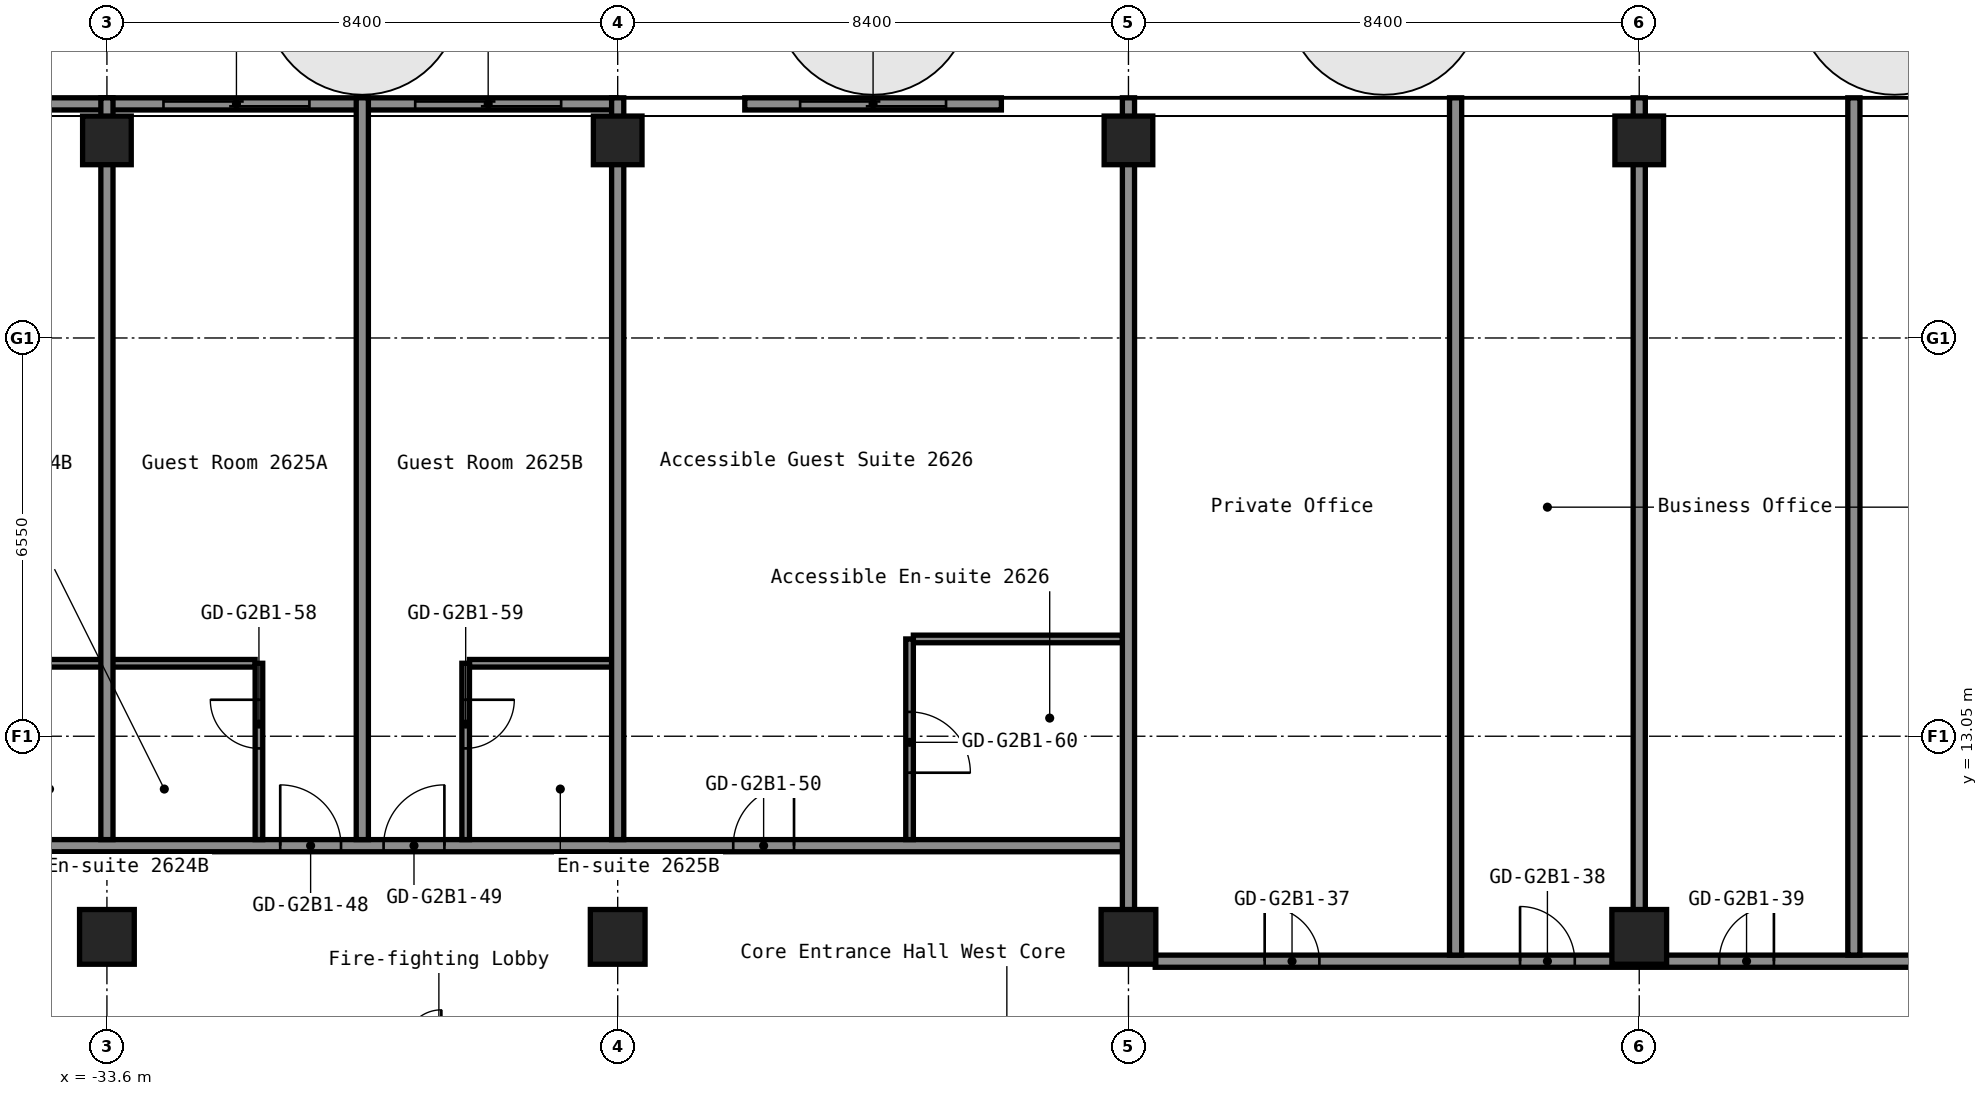
"""IFC4 building model, lengths in metres.
Left out: names, types, materials, properties, quantities, classifications, styles, units other than length and angle.
Written with IfcOpenShell. Run it as: python <this file> out.ifc"""

import sys

from ifc_helpers import new_model, si_unit, direction, frame, frame_2d, origin, origin_2d, place, context, subcontext, project, spatial, rectangle, hollow_rectangle, extrude, element, fill, save


model = new_model("IFC4")
c1 = context("Model", 3, precision=1e-05, world=origin(), true_north=direction((0.0, 1.0)))
c2 = subcontext(c1, "Body", "Model", "MODEL_VIEW")
j1 = project(units=[si_unit("LENGTHUNIT", "METRE"), si_unit("PLANEANGLEUNIT", "RADIAN")], contexts=[c1])
p1 = place(None, origin())
s1 = spatial("IfcSite", under=j1, at=p1, CompositionType="ELEMENT")
p2 = place(p1, origin())
s2 = spatial("IfcBuilding", under=s1, at=p2, CompositionType="ELEMENT")
p3 = place(p2, frame((0.0, 0.0, 94.6)))
s3 = spatial("IfcBuildingStorey", under=s2, at=p3, CompositionType="ELEMENT", Elevation=94.6)
p4 = place(p3, frame((-33.6, 9.75, 0.0), z_axis=(0.0, 0.0, 1.0), x_axis=(1.0, 0.0, 0.0)))
e1 = element("IfcColumn", 1, at=p4, inside=s3, PredefinedType="COLUMN", context=c2, shape_type="SweptSolid", body=[
    extrude(hollow_rectangle(XDim=0.9, YDim=0.9, WallThickness=0.036, at=origin_2d()), origin(), (0.0, 0.0, 1.0), 2.8),
])
p5 = place(p3, frame((-33.6, 22.85, 0.0), z_axis=(0.0, 0.0, 1.0), x_axis=(1.0, 0.0, 0.0)))
e2 = element("IfcColumn", 2, at=p5, inside=s3, PredefinedType="COLUMN", context=c2, shape_type="SweptSolid", body=[
    extrude(hollow_rectangle(XDim=0.8, YDim=0.8, WallThickness=0.032, at=origin_2d()), origin(), (0.0, 0.0, 1.0), 2.8),
])
p6 = place(p3, frame((-25.2, 9.75, 0.0), z_axis=(0.0, 0.0, 1.0), x_axis=(1.0, 0.0, 0.0)))
e3 = element("IfcColumn", 3, at=p6, inside=s3, PredefinedType="COLUMN", context=c2, shape_type="SweptSolid", body=[
    extrude(hollow_rectangle(XDim=0.9, YDim=0.9, WallThickness=0.036, at=origin_2d()), origin(), (0.0, 0.0, 1.0), 2.8),
])
p7 = place(p3, frame((-25.2, 22.85, 0.0), z_axis=(0.0, 0.0, 1.0), x_axis=(1.0, 0.0, 0.0)))
e4 = element("IfcColumn", 4, at=p7, inside=s3, PredefinedType="COLUMN", context=c2, shape_type="SweptSolid", body=[
    extrude(hollow_rectangle(XDim=0.8, YDim=0.8, WallThickness=0.032, at=origin_2d()), origin(), (0.0, 0.0, 1.0), 2.8),
])
p8 = place(p3, frame((-16.8, 9.75, 0.0), z_axis=(0.0, 0.0, 1.0), x_axis=(1.0, 0.0, 0.0)))
e5 = element("IfcColumn", 5, at=p8, inside=s3, PredefinedType="COLUMN", context=c2, shape_type="SweptSolid", body=[
    extrude(hollow_rectangle(XDim=0.9, YDim=0.9, WallThickness=0.036, at=origin_2d()), origin(), (0.0, 0.0, 1.0), 2.8),
])
p9 = place(p3, frame((-16.8, 22.85, 0.0), z_axis=(0.0, 0.0, 1.0), x_axis=(1.0, 0.0, 0.0)))
e6 = element("IfcColumn", 6, at=p9, inside=s3, PredefinedType="COLUMN", context=c2, shape_type="SweptSolid", body=[
    extrude(hollow_rectangle(XDim=0.8, YDim=0.8, WallThickness=0.032, at=origin_2d()), origin(), (0.0, 0.0, 1.0), 2.8),
])
p10 = place(p3, frame((-8.4, 9.75, 0.0), z_axis=(0.0, 0.0, 1.0), x_axis=(1.0, 0.0, 0.0)))
e7 = element("IfcColumn", 7, at=p10, inside=s3, PredefinedType="COLUMN", context=c2, shape_type="SweptSolid", body=[
    extrude(hollow_rectangle(XDim=0.9, YDim=0.9, WallThickness=0.036, at=origin_2d()), origin(), (0.0, 0.0, 1.0), 2.8),
])
p11 = place(p3, frame((-8.4, 22.85, 0.0), z_axis=(0.0, 0.0, 1.0), x_axis=(1.0, 0.0, 0.0)))
e8 = element("IfcColumn", 8, at=p11, inside=s3, PredefinedType="COLUMN", context=c2, shape_type="SweptSolid", body=[
    extrude(hollow_rectangle(XDim=0.8, YDim=0.8, WallThickness=0.032, at=origin_2d()), origin(), (0.0, 0.0, 1.0), 2.8),
])
p12 = place(p3, frame((-16.36, 9.35, 0.0), z_axis=(0.0, 0.0, 1.0), x_axis=(1.0, 0.0, 0.0)))
e9 = element("IfcWall", 9, at=p12, inside=s3, PredefinedType="PARTITIONING", context=c2, shape_type="SweptSolid", body=[
    extrude(rectangle(XDim=32.72, YDim=0.2, at=frame_2d((16.36, 0.0))), origin(), (0.0, 0.0, 1.0), 2.8),
])
p13 = place(p12, frame((1.8, 0.0, 0.0)))
e10 = element("IfcOpeningElement", 10, at=p13, cuts=e9, PredefinedType="OPENING", context=c2, shape_type="SweptSolid", body=[
    extrude(rectangle(XDim=0.9, YDim=2.1, at=frame_2d((0.45, 1.05))), frame((0.0, 0.11, 0.0), z_axis=(0.0, -1.0, 0.0), x_axis=(1.0, 0.0, 0.0)), (0.0, 0.0, 1.0), 0.22),
])
p14 = place(p12, frame((6.0, 0.0, 0.0)))
e11 = element("IfcOpeningElement", 11, at=p14, cuts=e9, PredefinedType="OPENING", context=c2, shape_type="SweptSolid", body=[
    extrude(rectangle(XDim=0.9, YDim=2.1, at=frame_2d((0.45, 1.05))), frame((0.0, 0.11, 0.0), z_axis=(0.0, -1.0, 0.0), x_axis=(1.0, 0.0, 0.0)), (0.0, 0.0, 1.0), 0.22),
])
p15 = place(p12, frame((9.275, 0.0, 0.0)))
e12 = element("IfcOpeningElement", 12, at=p15, cuts=e9, PredefinedType="OPENING", context=c2, shape_type="SweptSolid", body=[
    extrude(rectangle(XDim=0.9, YDim=2.1, at=frame_2d((0.45, 1.05))), frame((0.0, 0.11, 0.0), z_axis=(0.0, -1.0, 0.0), x_axis=(1.0, 0.0, 0.0)), (0.0, 0.0, 1.0), 0.22),
])
p16 = place(p12, frame((13.475, 0.0, 0.0)))
e13 = element("IfcOpeningElement", 13, at=p16, cuts=e9, PredefinedType="OPENING", context=c2, shape_type="SweptSolid", body=[
    extrude(rectangle(XDim=0.9, YDim=2.1, at=frame_2d((0.45, 1.05))), frame((0.0, 0.11, 0.0), z_axis=(0.0, -1.0, 0.0), x_axis=(1.0, 0.0, 0.0)), (0.0, 0.0, 1.0), 0.22),
])
p17 = place(p12, frame((19.21, 0.0, 0.0)))
e14 = element("IfcOpeningElement", 14, at=p17, cuts=e9, PredefinedType="OPENING", context=c2, shape_type="SweptSolid", body=[
    extrude(rectangle(XDim=1.0, YDim=2.1, at=frame_2d((0.5, 1.05))), frame((0.0, 0.11, 0.0), z_axis=(0.0, -1.0, 0.0), x_axis=(1.0, 0.0, 0.0)), (0.0, 0.0, 1.0), 0.22),
])
p18 = place(p12, frame((20.91, 0.0, 0.0)))
e15 = element("IfcOpeningElement", 15, at=p18, cuts=e9, PredefinedType="OPENING", context=c2, shape_type="SweptSolid", body=[
    extrude(rectangle(XDim=1.0, YDim=2.1, at=frame_2d((0.5, 1.05))), frame((0.0, 0.11, 0.0), z_axis=(0.0, -1.0, 0.0), x_axis=(1.0, 0.0, 0.0)), (0.0, 0.0, 1.0), 0.22),
])
p19 = place(p12, frame((27.61, 0.0, 0.0)))
e16 = element("IfcOpeningElement", 16, at=p19, cuts=e9, PredefinedType="OPENING", context=c2, shape_type="SweptSolid", body=[
    extrude(rectangle(XDim=1.0, YDim=2.1, at=frame_2d((0.5, 1.05))), frame((0.0, 0.11, 0.0), z_axis=(0.0, -1.0, 0.0), x_axis=(1.0, 0.0, 0.0)), (0.0, 0.0, 1.0), 0.22),
])
p20 = place(p12, frame((29.31, 0.0, 0.0)))
e17 = element("IfcOpeningElement", 17, at=p20, cuts=e9, PredefinedType="OPENING", context=c2, shape_type="SweptSolid", body=[
    extrude(rectangle(XDim=1.0, YDim=2.1, at=frame_2d((0.5, 1.05))), frame((0.0, 0.11, 0.0), z_axis=(0.0, -1.0, 0.0), x_axis=(1.0, 0.0, 0.0)), (0.0, 0.0, 1.0), 0.22),
])
p21 = place(p3, frame((-46.5, 11.25, 0.0), z_axis=(0.0, 0.0, 1.0), x_axis=(1.0, 0.0, 0.0)))
e18 = element("IfcWall", 18, at=p21, inside=s3, PredefinedType="PARTITIONING", context=c2, shape_type="SweptSolid", body=[
    extrude(rectangle(XDim=29.7, YDim=0.2, at=frame_2d((14.85, 0.0))), origin(), (0.0, 0.0, 1.0), 2.8),
])
p22 = place(p21, frame((1.95, 0.0, 0.0)))
e19 = element("IfcOpeningElement", 19, at=p22, cuts=e18, PredefinedType="OPENING", context=c2, shape_type="SweptSolid", body=[
    extrude(rectangle(XDim=0.9, YDim=2.1, at=frame_2d((0.45, 1.05))), frame((0.0, 0.11, 0.0), z_axis=(0.0, -1.0, 0.0), x_axis=(1.0, 0.0, 0.0)), (0.0, 0.0, 1.0), 0.22),
])
p23 = place(p21, frame((7.35, 0.0, 0.0)))
e20 = element("IfcOpeningElement", 20, at=p23, cuts=e18, PredefinedType="OPENING", context=c2, shape_type="SweptSolid", body=[
    extrude(rectangle(XDim=1.0, YDim=2.1, at=frame_2d((0.5, 1.05))), frame((0.0, 0.11, 0.0), z_axis=(0.0, -1.0, 0.0), x_axis=(1.0, 0.0, 0.0)), (0.0, 0.0, 1.0), 0.22),
])
p24 = place(p21, frame((9.05, 0.0, 0.0)))
e21 = element("IfcOpeningElement", 21, at=p24, cuts=e18, PredefinedType="OPENING", context=c2, shape_type="SweptSolid", body=[
    extrude(rectangle(XDim=1.0, YDim=2.1, at=frame_2d((0.5, 1.05))), frame((0.0, 0.11, 0.0), z_axis=(0.0, -1.0, 0.0), x_axis=(1.0, 0.0, 0.0)), (0.0, 0.0, 1.0), 0.22),
])
p25 = place(p21, frame((15.75, 0.0, 0.0)))
e22 = element("IfcOpeningElement", 22, at=p25, cuts=e18, PredefinedType="OPENING", context=c2, shape_type="SweptSolid", body=[
    extrude(rectangle(XDim=1.0, YDim=2.1, at=frame_2d((0.5, 1.05))), frame((0.0, 0.11, 0.0), z_axis=(0.0, -1.0, 0.0), x_axis=(1.0, 0.0, 0.0)), (0.0, 0.0, 1.0), 0.22),
])
p26 = place(p21, frame((17.45, 0.0, 0.0)))
e23 = element("IfcOpeningElement", 23, at=p26, cuts=e18, PredefinedType="OPENING", context=c2, shape_type="SweptSolid", body=[
    extrude(rectangle(XDim=1.0, YDim=2.1, at=frame_2d((0.5, 1.05))), frame((0.0, 0.11, 0.0), z_axis=(0.0, -1.0, 0.0), x_axis=(1.0, 0.0, 0.0)), (0.0, 0.0, 1.0), 0.22),
])
p27 = place(p21, frame((23.2, 0.0, 0.0)))
e24 = element("IfcOpeningElement", 24, at=p27, cuts=e18, PredefinedType="OPENING", context=c2, shape_type="SweptSolid", body=[
    extrude(rectangle(XDim=1.0, YDim=2.1, at=frame_2d((0.5, 1.05))), frame((0.0, 0.11, 0.0), z_axis=(0.0, -1.0, 0.0), x_axis=(1.0, 0.0, 0.0)), (0.0, 0.0, 1.0), 0.22),
])
p28 = place(p3, frame((-36.038, 14.25, 0.0), z_axis=(0.0, 0.0, 1.0), x_axis=(1.0, 0.0, 0.0)))
e25 = element("IfcWall", 25, at=p28, inside=s3, PredefinedType="PARTITIONING", context=c2, shape_type="SweptSolid", body=[
    extrude(rectangle(XDim=4.875, YDim=0.125, at=frame_2d((2.438, 0.0))), origin(), (0.0, 0.0, 1.0), 2.8),
])
p29 = place(p3, frame((-27.637, 14.25, 0.0), z_axis=(0.0, 0.0, 1.0), x_axis=(1.0, 0.0, 0.0)))
e26 = element("IfcWall", 26, at=p29, inside=s3, PredefinedType="PARTITIONING", context=c2, shape_type="SweptSolid", body=[
    extrude(rectangle(XDim=2.337, YDim=0.125, at=frame_2d((1.169, 0.0))), origin(), (0.0, 0.0, 1.0), 2.8),
])
p30 = place(p3, frame((-20.337, 14.65, 0.0), z_axis=(0.0, 0.0, 1.0), x_axis=(1.0, 0.0, 0.0)))
e27 = element("IfcWall", 27, at=p30, inside=s3, PredefinedType="PARTITIONING", context=c2, shape_type="SweptSolid", body=[
    extrude(rectangle(XDim=3.438, YDim=0.125, at=frame_2d((1.719, 0.0))), origin(), (0.0, 0.0, 1.0), 2.8),
])
p31 = place(p3, frame((-33.6, 11.35, 0.0), z_axis=(0.0, 0.0, 1.0), x_axis=(0.0, 1.0, 0.0)))
e28 = element("IfcWall", 28, at=p31, inside=s3, PredefinedType="PARTITIONING", context=c2, shape_type="SweptSolid", body=[
    extrude(rectangle(XDim=12.2, YDim=0.2, at=frame_2d((6.1, 0.0))), origin(), (0.0, 0.0, 1.0), 2.8),
])
p32 = place(p3, frame((-31.1, 11.35, 0.0), z_axis=(0.0, 0.0, 1.0), x_axis=(0.0, 1.0, 0.0)))
e29 = element("IfcWall", 29, at=p32, inside=s3, PredefinedType="PARTITIONING", context=c2, shape_type="SweptSolid", body=[
    extrude(rectangle(XDim=2.9, YDim=0.125, at=frame_2d((1.45, 0.0))), origin(), (0.0, 0.0, 1.0), 2.8),
])
p33 = place(p32, frame((1.5, 0.0, 0.0)))
e30 = element("IfcOpeningElement", 30, at=p33, cuts=e29, PredefinedType="OPENING", context=c2, shape_type="SweptSolid", body=[
    extrude(rectangle(XDim=0.8, YDim=2.1, at=frame_2d((0.4, 1.05))), frame((0.0, 0.073, 0.0), z_axis=(0.0, -1.0, 0.0), x_axis=(1.0, 0.0, 0.0)), (0.0, 0.0, 1.0), 0.145),
])
p34 = place(p3, frame((-29.4, 11.35, 0.0), z_axis=(0.0, 0.0, 1.0), x_axis=(0.0, 1.0, 0.0)))
e31 = element("IfcWall", 31, at=p34, inside=s3, PredefinedType="PARTITIONING", context=c2, shape_type="SweptSolid", body=[
    extrude(rectangle(XDim=12.2, YDim=0.2, at=frame_2d((6.1, 0.0))), origin(), (0.0, 0.0, 1.0), 2.8),
])
p35 = place(p3, frame((-27.7, 11.35, 0.0), z_axis=(0.0, 0.0, 1.0), x_axis=(0.0, 1.0, 0.0)))
e32 = element("IfcWall", 32, at=p35, inside=s3, PredefinedType="PARTITIONING", context=c2, shape_type="SweptSolid", body=[
    extrude(rectangle(XDim=2.9, YDim=0.125, at=frame_2d((1.45, 0.0))), origin(), (0.0, 0.0, 1.0), 2.8),
])
p36 = place(p35, frame((1.5, 0.0, 0.0)))
e33 = element("IfcOpeningElement", 33, at=p36, cuts=e32, PredefinedType="OPENING", context=c2, shape_type="SweptSolid", body=[
    extrude(rectangle(XDim=0.8, YDim=2.1, at=frame_2d((0.4, 1.05))), frame((0.0, 0.073, 0.0), z_axis=(0.0, -1.0, 0.0), x_axis=(1.0, 0.0, 0.0)), (0.0, 0.0, 1.0), 0.145),
])
p37 = place(p3, frame((-25.2, 11.35, 0.0), z_axis=(0.0, 0.0, 1.0), x_axis=(0.0, 1.0, 0.0)))
e34 = element("IfcWall", 34, at=p37, inside=s3, PredefinedType="PARTITIONING", context=c2, shape_type="SweptSolid", body=[
    extrude(rectangle(XDim=12.2, YDim=0.2, at=frame_2d((6.1, 0.0))), origin(), (0.0, 0.0, 1.0), 2.8),
])
p38 = place(p3, frame((-20.4, 11.35, 0.0), z_axis=(0.0, 0.0, 1.0), x_axis=(0.0, 1.0, 0.0)))
e35 = element("IfcWall", 35, at=p38, inside=s3, PredefinedType="PARTITIONING", context=c2, shape_type="SweptSolid", body=[
    extrude(rectangle(XDim=3.3, YDim=0.125, at=frame_2d((1.65, 0.0))), origin(), (0.0, 0.0, 1.0), 2.8),
])
p39 = place(p38, frame((1.1, 0.0, 0.0)))
e36 = element("IfcOpeningElement", 36, at=p39, cuts=e35, PredefinedType="OPENING", context=c2, shape_type="SweptSolid", body=[
    extrude(rectangle(XDim=1.0, YDim=2.1, at=frame_2d((0.5, 1.05))), frame((0.0, 0.073, 0.0), z_axis=(0.0, -1.0, 0.0), x_axis=(1.0, 0.0, 0.0)), (0.0, 0.0, 1.0), 0.145),
])
p40 = place(p3, frame((-16.8, 10.19, 0.0), z_axis=(0.0, 0.0, 1.0), x_axis=(0.0, 1.0, 0.0)))
e37 = element("IfcWall", 37, at=p40, inside=s3, PredefinedType="PARTITIONING", context=c2, shape_type="SweptSolid", body=[
    extrude(rectangle(XDim=13.36, YDim=0.2, at=frame_2d((6.68, 0.0))), origin(), (0.0, 0.0, 1.0), 2.8),
])
p41 = place(p3, frame((-11.42, 9.45, 0.0), z_axis=(0.0, 0.0, 1.0), x_axis=(0.0, 1.0, 0.0)))
e38 = element("IfcWall", 38, at=p41, inside=s3, PredefinedType="PARTITIONING", context=c2, shape_type="SweptSolid", body=[
    extrude(rectangle(XDim=14.1, YDim=0.2, at=frame_2d((7.05, 0.0))), origin(), (0.0, 0.0, 1.0), 2.8),
])
p42 = place(p3, frame((-8.4, 10.19, 0.0), z_axis=(0.0, 0.0, 1.0), x_axis=(0.0, 1.0, 0.0)))
e39 = element("IfcWall", 39, at=p42, inside=s3, PredefinedType="PARTITIONING", context=c2, shape_type="SweptSolid", body=[
    extrude(rectangle(XDim=13.36, YDim=0.2, at=frame_2d((6.68, 0.0))), origin(), (0.0, 0.0, 1.0), 2.8),
])
p43 = place(p3, frame((-4.87, 9.45, 0.0), z_axis=(0.0, 0.0, 1.0), x_axis=(0.0, 1.0, 0.0)))
e40 = element("IfcWall", 40, at=p43, inside=s3, PredefinedType="PARTITIONING", context=c2, shape_type="SweptSolid", body=[
    extrude(rectangle(XDim=14.1, YDim=0.2, at=frame_2d((7.05, 0.0))), origin(), (0.0, 0.0, 1.0), 2.8),
])
p44 = place(p3, frame((-18.89, 23.45, 0.0), z_axis=(0.0, 0.0, 1.0), x_axis=(-1.0, 0.0, 0.0)))
p45 = place(p44, frame((0.91, 0.0, 0.0)))
p46 = place(p45, frame((2.4, 0.0, 0.0), z_axis=(0.0, 0.0, 1.0), x_axis=(-1.0, 0.0, 0.0)))
e41 = element("IfcDoor", 41, at=p46, inside=s3, OperationType="SLIDING_TO_LEFT", PredefinedType="DOOR", context=c2, shape_type="SweptSolid", body=[
    extrude(rectangle(XDim=2.4, YDim=2.2, at=frame_2d((1.2, 1.1))), frame((0.0, 0.025, 0.0), z_axis=(0.0, -1.0, 0.0), x_axis=(1.0, 0.0, 0.0)), (0.0, 0.0, 1.0), 0.05),
])
p47 = place(p3, frame((-25.22, 23.45, 0.0), z_axis=(0.0, 0.0, 1.0), x_axis=(-1.0, 0.0, 0.0)))
p48 = place(p47, frame((0.91, 0.0, 0.0)))
p49 = place(p48, frame((2.4, 0.0, 0.0), z_axis=(0.0, 0.0, 1.0), x_axis=(-1.0, 0.0, 0.0)))
e42 = element("IfcDoor", 42, at=p49, inside=s3, OperationType="SLIDING_TO_LEFT", PredefinedType="DOOR", context=c2, shape_type="SweptSolid", body=[
    extrude(rectangle(XDim=2.4, YDim=2.2, at=frame_2d((1.2, 1.1))), frame((0.0, 0.025, 0.0), z_axis=(0.0, -1.0, 0.0), x_axis=(1.0, 0.0, 0.0)), (0.0, 0.0, 1.0), 0.05),
])
p50 = place(p3, frame((-29.36, 23.45, 0.0), z_axis=(0.0, 0.0, 1.0), x_axis=(-1.0, 0.0, 0.0)))
p51 = place(p50, frame((0.91, 0.0, 0.0)))
p52 = place(p51, frame((2.4, 0.0, 0.0), z_axis=(0.0, 0.0, 1.0), x_axis=(-1.0, 0.0, 0.0)))
e43 = element("IfcDoor", 43, at=p52, inside=s3, OperationType="SLIDING_TO_LEFT", PredefinedType="DOOR", context=c2, shape_type="SweptSolid", body=[
    extrude(rectangle(XDim=2.4, YDim=2.2, at=frame_2d((1.2, 1.1))), frame((0.0, 0.025, 0.0), z_axis=(0.0, -1.0, 0.0), x_axis=(1.0, 0.0, 0.0)), (0.0, 0.0, 1.0), 0.05),
])
p53 = place(p13, origin())
e44 = element("IfcDoor", 44, at=p53, inside=s3, OperationType="SINGLE_SWING_RIGHT", PredefinedType="DOOR", context=c2, shape_type="SweptSolid", body=[
    extrude(rectangle(XDim=0.9, YDim=2.1, at=frame_2d((0.45, 1.05))), frame((0.0, 0.025, 0.0), z_axis=(0.0, -1.0, 0.0), x_axis=(1.0, 0.0, 0.0)), (0.0, 0.0, 1.0), 0.05),
])
fill(e10, e44)
p54 = place(p14, origin())
e45 = element("IfcDoor", 45, at=p54, inside=s3, OperationType="SINGLE_SWING_RIGHT", PredefinedType="DOOR", context=c2, shape_type="SweptSolid", body=[
    extrude(rectangle(XDim=0.9, YDim=2.1, at=frame_2d((0.45, 1.05))), frame((0.0, 0.025, 0.0), z_axis=(0.0, -1.0, 0.0), x_axis=(1.0, 0.0, 0.0)), (0.0, 0.0, 1.0), 0.05),
])
fill(e11, e45)
p55 = place(p15, origin())
e46 = element("IfcDoor", 46, at=p55, inside=s3, OperationType="SINGLE_SWING_LEFT", PredefinedType="DOOR", context=c2, shape_type="SweptSolid", body=[
    extrude(rectangle(XDim=0.9, YDim=2.1, at=frame_2d((0.45, 1.05))), frame((0.0, 0.025, 0.0), z_axis=(0.0, -1.0, 0.0), x_axis=(1.0, 0.0, 0.0)), (0.0, 0.0, 1.0), 0.05),
])
fill(e12, e46)
p56 = place(p25, origin())
e47 = element("IfcDoor", 47, at=p56, inside=s3, OperationType="SINGLE_SWING_RIGHT", PredefinedType="DOOR", context=c2, shape_type="SweptSolid", body=[
    extrude(rectangle(XDim=1.0, YDim=2.1, at=frame_2d((0.5, 1.05))), frame((0.0, 0.025, 0.0), z_axis=(0.0, -1.0, 0.0), x_axis=(1.0, 0.0, 0.0)), (0.0, 0.0, 1.0), 0.05),
])
fill(e22, e47)
p57 = place(p26, origin())
e48 = element("IfcDoor", 48, at=p57, inside=s3, OperationType="SINGLE_SWING_LEFT", PredefinedType="DOOR", context=c2, shape_type="SweptSolid", body=[
    extrude(rectangle(XDim=1.0, YDim=2.1, at=frame_2d((0.5, 1.05))), frame((0.0, 0.025, 0.0), z_axis=(0.0, -1.0, 0.0), x_axis=(1.0, 0.0, 0.0)), (0.0, 0.0, 1.0), 0.05),
])
fill(e23, e48)
p58 = place(p27, origin())
e49 = element("IfcDoor", 49, at=p58, inside=s3, OperationType="SINGLE_SWING_LEFT", PredefinedType="DOOR", context=c2, shape_type="SweptSolid", body=[
    extrude(rectangle(XDim=1.0, YDim=2.1, at=frame_2d((0.5, 1.05))), frame((0.0, 0.025, 0.0), z_axis=(0.0, -1.0, 0.0), x_axis=(1.0, 0.0, 0.0)), (0.0, 0.0, 1.0), 0.05),
])
fill(e24, e49)
p59 = place(p33, origin())
e50 = element("IfcDoor", 50, at=p59, inside=s3, OperationType="SINGLE_SWING_LEFT", PredefinedType="DOOR", context=c2, shape_type="SweptSolid", body=[
    extrude(rectangle(XDim=0.8, YDim=2.1, at=frame_2d((0.4, 1.05))), frame((0.0, 0.025, 0.0), z_axis=(0.0, -1.0, 0.0), x_axis=(1.0, 0.0, 0.0)), (0.0, 0.0, 1.0), 0.05),
])
fill(e30, e50)
p60 = place(p36, origin())
e51 = element("IfcDoor", 51, at=p60, inside=s3, OperationType="SINGLE_SWING_RIGHT", PredefinedType="DOOR", context=c2, shape_type="SweptSolid", body=[
    extrude(rectangle(XDim=0.8, YDim=2.1, at=frame_2d((0.4, 1.05))), frame((0.0, 0.025, 0.0), z_axis=(0.0, -1.0, 0.0), x_axis=(1.0, 0.0, 0.0)), (0.0, 0.0, 1.0), 0.05),
])
fill(e33, e51)
p61 = place(p39, origin())
e52 = element("IfcDoor", 52, at=p61, inside=s3, OperationType="SINGLE_SWING_LEFT", PredefinedType="DOOR", context=c2, shape_type="SweptSolid", body=[
    extrude(rectangle(XDim=1.0, YDim=2.1, at=frame_2d((0.5, 1.05))), frame((0.0, 0.025, 0.0), z_axis=(0.0, -1.0, 0.0), x_axis=(1.0, 0.0, 0.0)), (0.0, 0.0, 1.0), 0.05),
])
fill(e36, e52)
save(model, sys.argv[1])
